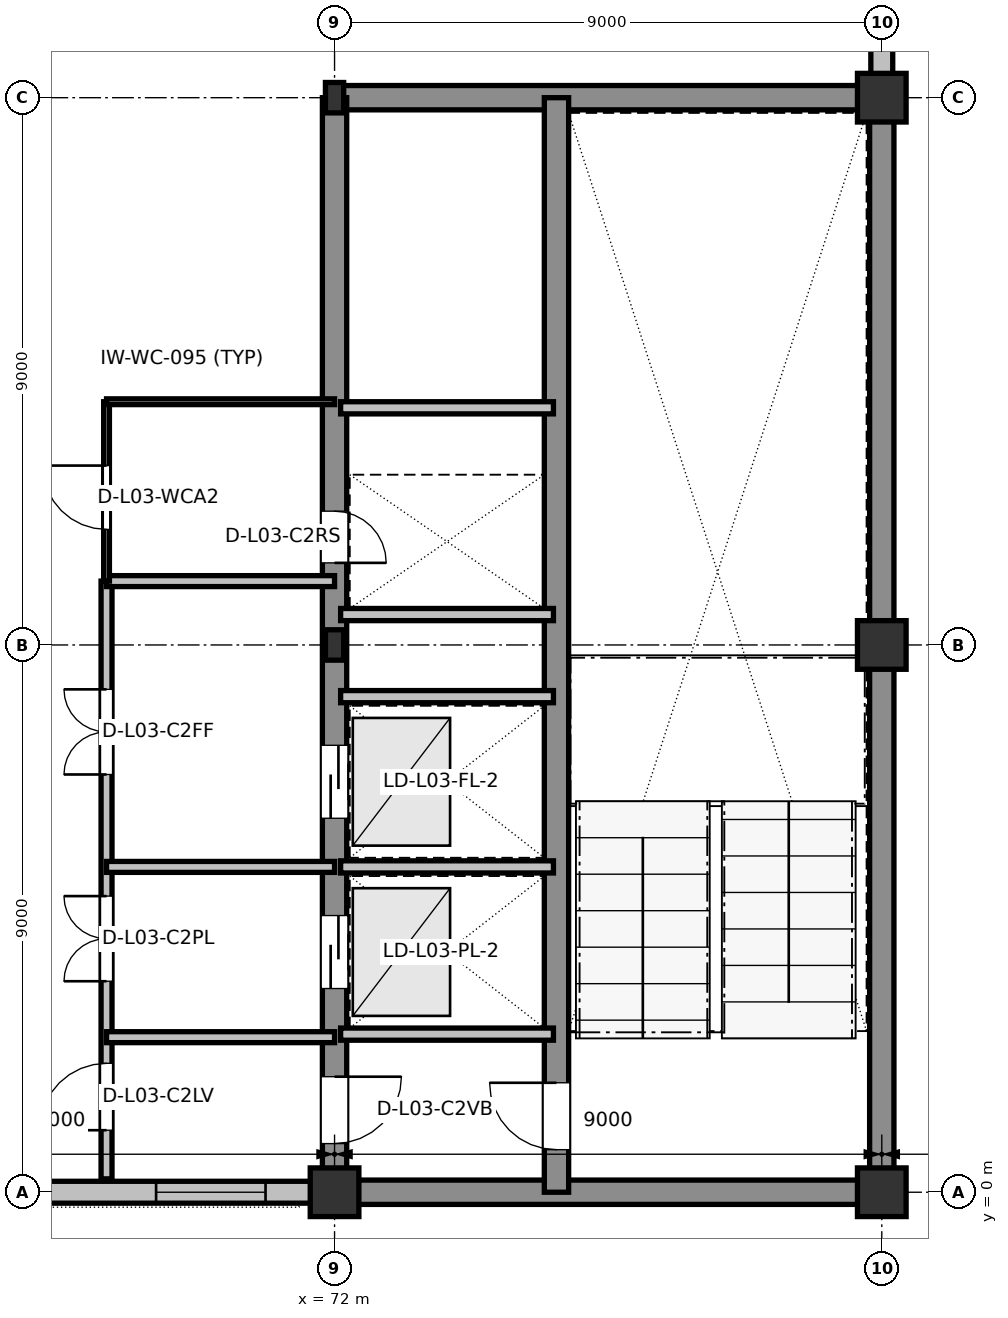
"""IFC4 building model, lengths in metres.
Left out: names, types, materials, properties, quantities, classifications, styles, units other than length and angle.
Written with IfcOpenShell. Run it as: python <this file> out.ifc"""

import sys

from ifc_helpers import new_model, si_unit, direction, frame, frame_2d, origin, origin_2d, place, context, subcontext, project, spatial, rectangle, i_section, extrude, element, fill, save


model = new_model("IFC4")
c1 = context("Model", 3, precision=1e-05, world=origin(), true_north=direction((0.0, 1.0)))
c2 = subcontext(c1, "Body", "Model", "MODEL_VIEW")
j1 = project(units=[si_unit("LENGTHUNIT", "METRE"), si_unit("PLANEANGLEUNIT", "RADIAN")], contexts=[c1])
p1 = place(None, origin())
s1 = spatial("IfcSite", under=j1, at=p1, CompositionType="ELEMENT")
p2 = place(p1, origin())
s2 = spatial("IfcBuilding", under=s1, at=p2, CompositionType="ELEMENT")
p3 = place(p2, frame((0.0, 0.0, 15.0)))
s3 = spatial("IfcBuildingStorey", under=s2, at=p3, CompositionType="ELEMENT", Elevation=15.0)
p4 = place(p3, frame((72.0, 0.0, 0.0), z_axis=(0.0, 0.0, 1.0), x_axis=(1.0, 0.0, 0.0)))
e1 = element("IfcColumn", 1, at=p4, inside=s3, PredefinedType="COLUMN", context=c2, shape_type="SweptSolid", body=[
    extrude(rectangle(XDim=0.8, YDim=0.8, at=origin_2d()), origin(), (0.0, 0.0, 1.0), 4.2),
])
for number, where, z_axis, x_axis in (
    (2, (72.0, 9.0, 0.0), (0.0, 0.0, 1.0), (1.0, 0.0, 0.0)),
    (3, (72.0, 18.0, 0.0), (0.0, 0.0, 1.0), (1.0, 0.0, 0.0)),
):
    element("IfcColumn", number, at=place(p3, frame(where, z_axis=z_axis, x_axis=x_axis)), inside=s3, PredefinedType="COLUMN", context=c2, shape_type="SweptSolid", body=[
        extrude(i_section(OverallWidth=0.3, OverallDepth=0.5, WebThickness=0.014, FlangeThickness=0.028, at=origin_2d()), origin(), (0.0, 0.0, 1.0), 4.2),
    ])
for number, where, z_axis, x_axis in (
    (4, (81.0, 0.0, 0.0), (0.0, 0.0, 1.0), (1.0, 0.0, 0.0)),
    (5, (81.0, 9.0, 0.0), (0.0, 0.0, 1.0), (1.0, 0.0, 0.0)),
    (6, (81.0, 18.0, 0.0), (0.0, 0.0, 1.0), (1.0, 0.0, 0.0)),
):
    element("IfcColumn", number, at=place(p3, frame(where, z_axis=z_axis, x_axis=x_axis)), inside=s3, PredefinedType="COLUMN", context=c2, shape_type="SweptSolid", body=[
        extrude(rectangle(XDim=0.8, YDim=0.8, at=origin_2d()), origin(), (0.0, 0.0, 1.0), 4.2),
    ])
p5 = place(p3, frame((63.385, 0.0, 0.0), z_axis=(0.0, 0.0, 1.0), x_axis=(1.0, 0.0, 0.0)))
e7 = element("IfcWall", 7, at=p5, inside=s3, PredefinedType="STANDARD", context=c2, shape_type="SweptSolid", body=[
    extrude(rectangle(XDim=8.23, YDim=0.36, at=frame_2d((4.115, 0.0))), origin(), (0.0, 0.0, 1.0), 3.635),
])
p6 = place(p5, frame((5.68, 0.0, 0.9)))
e8 = element("IfcOpeningElement", 8, at=p6, cuts=e7, PredefinedType="OPENING", context=c2, shape_type="SweptSolid", body=[
    extrude(rectangle(XDim=1.8, YDim=2.1, at=frame_2d((0.9, 1.05))), frame((0.0, 0.19, 0.0), z_axis=(0.0, -1.0, 0.0), x_axis=(1.0, 0.0, 0.0)), (0.0, 0.0, 1.0), 0.38),
])
p7 = place(p3, frame((81.0, 18.385, 0.0), z_axis=(0.0, 0.0, 1.0), x_axis=(0.0, 1.0, 0.0)))
e9 = element("IfcWall", 9, at=p7, inside=s3, PredefinedType="STANDARD", context=c2, shape_type="SweptSolid", body=[
    extrude(rectangle(XDim=2.69, YDim=0.36, at=frame_2d((1.345, 0.0))), origin(), (0.0, 0.0, 1.0), 3.94),
])
p8 = place(p3, frame((72.0, 0.0, 0.0), z_axis=(0.0, 0.0, 1.0), x_axis=(1.0, 0.0, 0.0)))
e10 = element("IfcWall", 10, at=p8, inside=s3, PredefinedType="SHEAR", context=c2, shape_type="SweptSolid", body=[
    extrude(rectangle(XDim=9.0, YDim=0.4, at=frame_2d((4.5, 0.0))), origin(), (0.0, 0.0, 1.0), 3.96),
])
p9 = place(p3, frame((81.0, 0.0, 0.0), z_axis=(0.0, 0.0, 1.0), x_axis=(0.0, 1.0, 0.0)))
e11 = element("IfcWall", 11, at=p9, inside=s3, PredefinedType="SHEAR", context=c2, shape_type="SweptSolid", body=[
    extrude(rectangle(XDim=18.0, YDim=0.4, at=frame_2d((9.0, 0.0))), origin(), (0.0, 0.0, 1.0), 3.96),
])
p10 = place(p3, frame((81.0, 18.0, 0.0), z_axis=(0.0, 0.0, 1.0), x_axis=(-1.0, 0.0, 0.0)))
e12 = element("IfcWall", 12, at=p10, inside=s3, PredefinedType="SHEAR", context=c2, shape_type="SweptSolid", body=[
    extrude(rectangle(XDim=9.0, YDim=0.4, at=frame_2d((4.5, 0.0))), origin(), (0.0, 0.0, 1.0), 3.96),
])
p11 = place(p3, frame((72.0, 18.0, 0.0), z_axis=(0.0, 0.0, 1.0), x_axis=(0.0, -1.0, 0.0)))
e13 = element("IfcWall", 13, at=p11, inside=s3, PredefinedType="SHEAR", context=c2, shape_type="SweptSolid", body=[
    extrude(rectangle(XDim=18.0, YDim=0.4, at=frame_2d((9.0, 0.0))), origin(), (0.0, 0.0, 1.0), 3.96),
])
p12 = place(p11, frame((16.1, 0.0, 0.0)))
e14 = element("IfcOpeningElement", 14, at=p12, cuts=e13, PredefinedType="OPENING", context=c2, shape_type="SweptSolid", body=[
    extrude(rectangle(XDim=1.1, YDim=2.16, at=frame_2d((0.55, 1.08))), frame((0.0, 0.21, 0.0), z_axis=(0.0, -1.0, 0.0), x_axis=(1.0, 0.0, 0.0)), (0.0, 0.0, 1.0), 0.42),
])
p13 = place(p11, frame((13.45, 0.0, 0.0)))
e15 = element("IfcOpeningElement", 15, at=p13, cuts=e13, PredefinedType="OPENING", context=c2, shape_type="SweptSolid", body=[
    extrude(rectangle(XDim=1.2, YDim=2.2, at=frame_2d((0.6, 1.1))), frame((0.0, 0.21, 0.0), z_axis=(0.0, -1.0, 0.0), x_axis=(1.0, 0.0, 0.0)), (0.0, 0.0, 1.0), 0.42),
])
p14 = place(p11, frame((10.65, 0.0, 0.0)))
e16 = element("IfcOpeningElement", 16, at=p14, cuts=e13, PredefinedType="OPENING", context=c2, shape_type="SweptSolid", body=[
    extrude(rectangle(XDim=1.2, YDim=2.2, at=frame_2d((0.6, 1.1))), frame((0.0, 0.21, 0.0), z_axis=(0.0, -1.0, 0.0), x_axis=(1.0, 0.0, 0.0)), (0.0, 0.0, 1.0), 0.42),
])
p15 = place(p11, frame((6.8, 0.0, 0.0)))
e17 = element("IfcOpeningElement", 17, at=p15, cuts=e13, PredefinedType="OPENING", context=c2, shape_type="SweptSolid", body=[
    extrude(rectangle(XDim=0.85, YDim=2.1, at=frame_2d((0.425, 1.05))), frame((0.0, 0.21, 0.0), z_axis=(0.0, -1.0, 0.0), x_axis=(1.0, 0.0, 0.0)), (0.0, 0.0, 1.0), 0.42),
])
p16 = place(p3, frame((75.65, 0.0, 0.0), z_axis=(0.0, 0.0, 1.0), x_axis=(0.0, 1.0, 0.0)))
e18 = element("IfcWall", 18, at=p16, inside=s3, PredefinedType="SHEAR", context=c2, shape_type="SweptSolid", body=[
    extrude(rectangle(XDim=18.0, YDim=0.4, at=frame_2d((9.0, 0.0))), origin(), (0.0, 0.0, 1.0), 3.96),
])
p17 = place(p16, frame((0.7, 0.0, 0.0)))
e19 = element("IfcOpeningElement", 19, at=p17, cuts=e18, PredefinedType="OPENING", context=c2, shape_type="SweptSolid", body=[
    extrude(rectangle(XDim=1.1, YDim=2.16, at=frame_2d((0.55, 1.08))), frame((0.0, 0.21, 0.0), z_axis=(0.0, -1.0, 0.0), x_axis=(1.0, 0.0, 0.0)), (0.0, 0.0, 1.0), 0.42),
])
for number, where, z_axis, x_axis in (
    (20, (72.1, 2.6, 0.0), (0.0, 0.0, 1.0), (1.0, 0.0, 0.0)),
    (21, (72.1, 5.35, 0.0), (0.0, 0.0, 1.0), (1.0, 0.0, 0.0)),
    (22, (72.1, 8.15, 0.0), (0.0, 0.0, 1.0), (1.0, 0.0, 0.0)),
    (23, (72.1, 9.5, 0.0), (0.0, 0.0, 1.0), (1.0, 0.0, 0.0)),
    (24, (72.1, 12.9, 0.0), (0.0, 0.0, 1.0), (1.0, 0.0, 0.0)),
):
    element("IfcWall", number, at=place(p3, frame(where, z_axis=z_axis, x_axis=x_axis)), inside=s3, PredefinedType="PARTITIONING", context=c2, shape_type="SweptSolid", body=[
        extrude(rectangle(XDim=3.5, YDim=0.2, at=frame_2d((1.75, 0.0))), origin(), (0.0, 0.0, 1.0), 3.96),
    ])
p18 = place(p3, frame((68.25, 0.22, 0.0), z_axis=(0.0, 0.0, 1.0), x_axis=(0.0, 1.0, 0.0)))
e25 = element("IfcWall", 25, at=p18, inside=s3, PredefinedType="PARTITIONING", context=c2, shape_type="SweptSolid", body=[
    extrude(rectangle(XDim=9.83, YDim=0.18, at=frame_2d((4.915, 0.0))), origin(), (0.0, 0.0, 1.0), 3.96),
])
p19 = place(p18, frame((0.8, 0.0, 0.0)))
e26 = element("IfcOpeningElement", 26, at=p19, cuts=e25, PredefinedType="OPENING", context=c2, shape_type="SweptSolid", body=[
    extrude(rectangle(XDim=1.1, YDim=2.16, at=frame_2d((0.55, 1.08))), frame((0.0, 0.1, 0.0), z_axis=(0.0, -1.0, 0.0), x_axis=(1.0, 0.0, 0.0)), (0.0, 0.0, 1.0), 0.2),
])
p20 = place(p18, frame((3.25, 0.0, 0.0)))
e27 = element("IfcOpeningElement", 27, at=p20, cuts=e25, PredefinedType="OPENING", context=c2, shape_type="SweptSolid", body=[
    extrude(rectangle(XDim=1.4, YDim=2.2, at=frame_2d((0.7, 1.1))), frame((0.0, 0.1, 0.0), z_axis=(0.0, -1.0, 0.0), x_axis=(1.0, 0.0, 0.0)), (0.0, 0.0, 1.0), 0.2),
])
p21 = place(p18, frame((6.65, 0.0, 0.0)))
e28 = element("IfcOpeningElement", 28, at=p21, cuts=e25, PredefinedType="OPENING", context=c2, shape_type="SweptSolid", body=[
    extrude(rectangle(XDim=1.4, YDim=2.2, at=frame_2d((0.7, 1.1))), frame((0.0, 0.1, 0.0), z_axis=(0.0, -1.0, 0.0), x_axis=(1.0, 0.0, 0.0)), (0.0, 0.0, 1.0), 0.2),
])
for number, where, z_axis, x_axis in (
    (29, (68.25, 2.55, 0.0), (0.0, 0.0, 1.0), (1.0, 0.0, 0.0)),
    (30, (68.25, 5.35, 0.0), (0.0, 0.0, 1.0), (1.0, 0.0, 0.0)),
    (31, (68.25, 10.05, 0.0), (0.0, 0.0, 1.0), (1.0, 0.0, 0.0)),
):
    element("IfcWall", number, at=place(p3, frame(where, z_axis=z_axis, x_axis=x_axis)), inside=s3, PredefinedType="PARTITIONING", context=c2, shape_type="SweptSolid", body=[
        extrude(rectangle(XDim=3.75, YDim=0.18, at=frame_2d((1.875, 0.0))), origin(), (0.0, 0.0, 1.0), 3.96),
    ])
p22 = place(p3, frame((68.25, 10.05, 0.0), z_axis=(0.0, 0.0, 1.0), x_axis=(0.0, 1.0, 0.0)))
e32 = element("IfcWall", 32, at=p22, inside=s3, PredefinedType="PARTITIONING", context=c2, shape_type="SweptSolid", body=[
    extrude(rectangle(XDim=2.95, YDim=0.095, at=frame_2d((1.475, 0.0))), origin(), (0.0, 0.0, 1.0), 3.96),
])
p23 = place(p22, frame((0.85, 0.0, 0.0)))
e33 = element("IfcOpeningElement", 33, at=p23, cuts=e32, PredefinedType="OPENING", context=c2, shape_type="SweptSolid", body=[
    extrude(rectangle(XDim=1.05, YDim=2.13, at=frame_2d((0.525, 1.065))), frame((0.0, 0.057, 0.0), z_axis=(0.0, -1.0, 0.0), x_axis=(1.0, 0.0, 0.0)), (0.0, 0.0, 1.0), 0.115),
])
p24 = place(p3, frame((68.25, 13.0, 0.0), z_axis=(0.0, 0.0, 1.0), x_axis=(1.0, 0.0, 0.0)))
e34 = element("IfcWall", 34, at=p24, inside=s3, PredefinedType="PARTITIONING", context=c2, shape_type="SweptSolid", body=[
    extrude(rectangle(XDim=3.75, YDim=0.095, at=frame_2d((1.875, 0.0))), origin(), (0.0, 0.0, 1.0), 3.96),
])
p25 = place(p6, origin())
e35 = element("IfcWindow", 35, at=p25, inside=s3, PartitioningType="SINGLE_PANEL", PredefinedType="WINDOW", context=c2, shape_type="SweptSolid", body=[
    extrude(rectangle(XDim=1.8, YDim=2.1, at=frame_2d((0.9, 1.05))), frame((0.0, 0.03, 0.0), z_axis=(0.0, -1.0, 0.0), x_axis=(1.0, 0.0, 0.0)), (0.0, 0.0, 1.0), 0.06),
])
fill(e8, e35)
p26 = place(p17, origin())
e36 = element("IfcDoor", 36, at=p26, inside=s3, OperationType="SINGLE_SWING_RIGHT", PredefinedType="DOOR", context=c2, shape_type="SweptSolid", body=[
    extrude(rectangle(XDim=1.1, YDim=2.16, at=frame_2d((0.55, 1.08))), frame((0.0, 0.025, 0.0), z_axis=(0.0, -1.0, 0.0), x_axis=(1.0, 0.0, 0.0)), (0.0, 0.0, 1.0), 0.05),
])
fill(e19, e36)
p27 = place(p12, origin())
e37 = element("IfcDoor", 37, at=p27, inside=s3, OperationType="SINGLE_SWING_LEFT", PredefinedType="DOOR", context=c2, shape_type="SweptSolid", body=[
    extrude(rectangle(XDim=1.1, YDim=2.16, at=frame_2d((0.55, 1.08))), frame((0.0, 0.025, 0.0), z_axis=(0.0, -1.0, 0.0), x_axis=(1.0, 0.0, 0.0)), (0.0, 0.0, 1.0), 0.05),
])
fill(e14, e37)
p28 = place(p13, origin())
e38 = element("IfcDoor", 38, at=p28, inside=s3, OperationType="SLIDING_TO_LEFT", PredefinedType="DOOR", context=c2, shape_type="SweptSolid", body=[
    extrude(rectangle(XDim=1.2, YDim=2.2, at=frame_2d((0.6, 1.1))), frame((0.0, 0.025, 0.0), z_axis=(0.0, -1.0, 0.0), x_axis=(1.0, 0.0, 0.0)), (0.0, 0.0, 1.0), 0.05),
])
fill(e15, e38)
p29 = place(p14, origin())
e39 = element("IfcDoor", 39, at=p29, inside=s3, OperationType="SLIDING_TO_LEFT", PredefinedType="DOOR", context=c2, shape_type="SweptSolid", body=[
    extrude(rectangle(XDim=1.2, YDim=2.2, at=frame_2d((0.6, 1.1))), frame((0.0, 0.025, 0.0), z_axis=(0.0, -1.0, 0.0), x_axis=(1.0, 0.0, 0.0)), (0.0, 0.0, 1.0), 0.05),
])
fill(e16, e39)
p30 = place(p15, origin())
e40 = element("IfcDoor", 40, at=p30, inside=s3, OperationType="SINGLE_SWING_RIGHT", PredefinedType="DOOR", context=c2, shape_type="SweptSolid", body=[
    extrude(rectangle(XDim=0.85, YDim=2.1, at=frame_2d((0.425, 1.05))), frame((0.0, 0.025, 0.0), z_axis=(0.0, -1.0, 0.0), x_axis=(1.0, 0.0, 0.0)), (0.0, 0.0, 1.0), 0.05),
])
fill(e17, e40)
p31 = place(p19, origin())
e41 = element("IfcDoor", 41, at=p31, inside=s3, OperationType="SINGLE_SWING_LEFT", PredefinedType="DOOR", context=c2, shape_type="SweptSolid", body=[
    extrude(rectangle(XDim=1.1, YDim=2.16, at=frame_2d((0.55, 1.08))), frame((0.0, 0.025, 0.0), z_axis=(0.0, -1.0, 0.0), x_axis=(1.0, 0.0, 0.0)), (0.0, 0.0, 1.0), 0.05),
])
fill(e26, e41)
p32 = place(p20, origin())
e42 = element("IfcDoor", 42, at=p32, inside=s3, OperationType="DOUBLE_DOOR_SINGLE_SWING", PredefinedType="DOOR", context=c2, shape_type="SweptSolid", body=[
    extrude(rectangle(XDim=1.4, YDim=2.2, at=frame_2d((0.7, 1.1))), frame((0.0, 0.025, 0.0), z_axis=(0.0, -1.0, 0.0), x_axis=(1.0, 0.0, 0.0)), (0.0, 0.0, 1.0), 0.05),
])
fill(e27, e42)
p33 = place(p21, origin())
e43 = element("IfcDoor", 43, at=p33, inside=s3, OperationType="DOUBLE_DOOR_SINGLE_SWING", PredefinedType="DOOR", context=c2, shape_type="SweptSolid", body=[
    extrude(rectangle(XDim=1.4, YDim=2.2, at=frame_2d((0.7, 1.1))), frame((0.0, 0.025, 0.0), z_axis=(0.0, -1.0, 0.0), x_axis=(1.0, 0.0, 0.0)), (0.0, 0.0, 1.0), 0.05),
])
fill(e28, e43)
p34 = place(p23, origin())
e44 = element("IfcDoor", 44, at=p34, inside=s3, OperationType="SINGLE_SWING_RIGHT", PredefinedType="DOOR", context=c2, shape_type="SweptSolid", body=[
    extrude(rectangle(XDim=1.05, YDim=2.13, at=frame_2d((0.525, 1.065))), frame((0.0, 0.025, 0.0), z_axis=(0.0, -1.0, 0.0), x_axis=(1.0, 0.0, 0.0)), (0.0, 0.0, 1.0), 0.05),
])
fill(e33, e44)
save(model, sys.argv[1])
